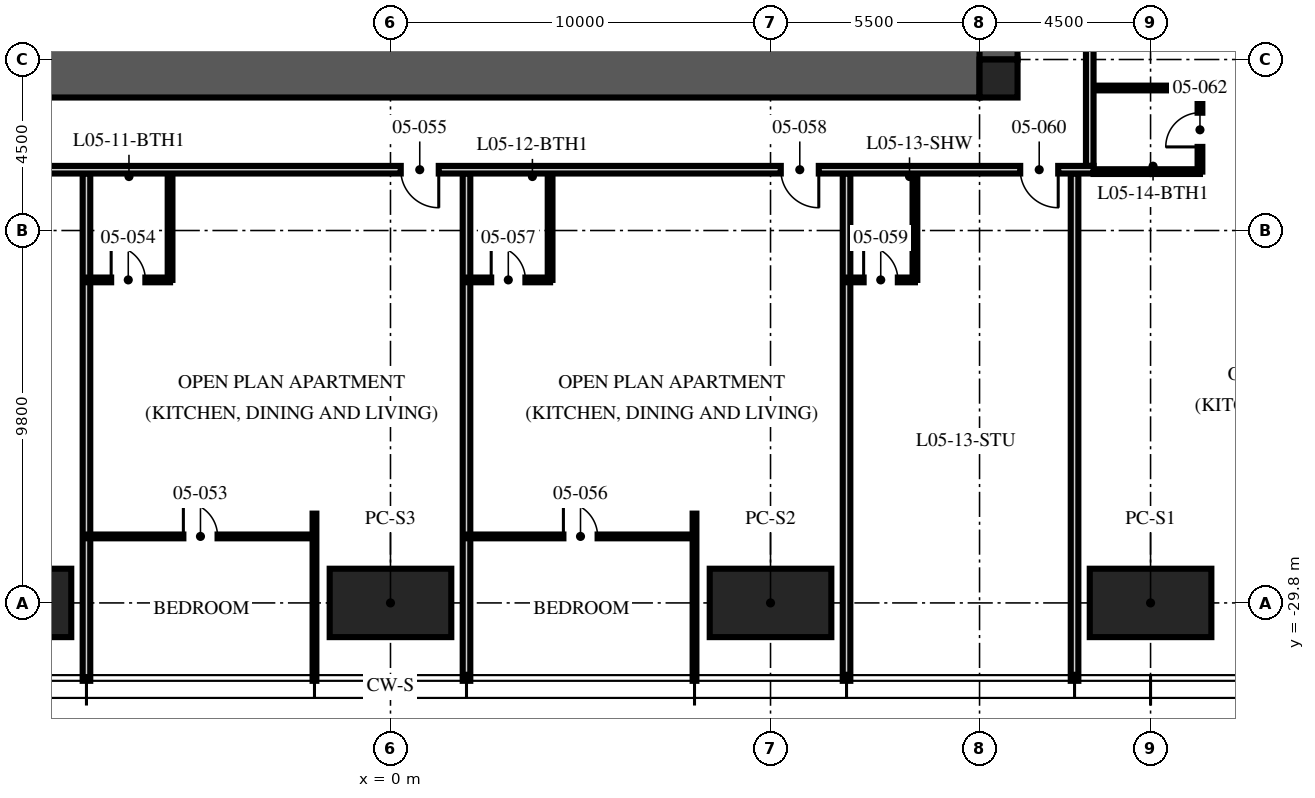
"""IFC4 building model, lengths in metres.
Left out: names, types, materials, properties, quantities, classifications, styles, units other than length and angle.
Written with IfcOpenShell. Run it as: python <this file> out.ifc"""

import sys

from ifc_helpers import new_model, si_unit, direction, frame, frame_2d, origin, origin_2d, place, context, subcontext, project, spatial, rectangle, hollow_rectangle, extrude, element, fill, save


model = new_model("IFC4")
c1 = context("Model", 3, precision=1e-05, world=origin(), true_north=direction((0.0, 1.0)))
c2 = subcontext(c1, "Body", "Model", "MODEL_VIEW")
j1 = project(units=[si_unit("LENGTHUNIT", "METRE"), si_unit("PLANEANGLEUNIT", "RADIAN")], contexts=[c1])
p1 = place(None, origin())
s1 = spatial("IfcSite", under=j1, at=p1, CompositionType="ELEMENT")
p2 = place(p1, origin())
s2 = spatial("IfcBuilding", under=s1, at=p2, CompositionType="ELEMENT")
p3 = place(p2, frame((0.0, 0.0, 24.75)))
s3 = spatial("IfcBuildingStorey", under=s2, at=p3, CompositionType="ELEMENT", Elevation=24.75)
p4 = place(p3, frame((15.5, -15.5, -0.25), z_axis=(0.0, 0.0, 1.0), x_axis=(0.0, 1.0, 0.0)))
e1 = element("IfcWall", 1, at=p4, inside=s3, PredefinedType="SHEAR", context=c2, shape_type="SweptSolid", body=[
    extrude(rectangle(XDim=31.0, YDim=2.0, at=frame_2d((15.5, 0.0))), origin(), (0.0, 0.0, 1.0), 3.75),
])
p5 = place(p4, frame((6.5, 0.0, 0.25)))
e2 = element("IfcOpeningElement", 2, at=p5, cuts=e1, PredefinedType="OPENING", context=c2, shape_type="SweptSolid", body=[
    extrude(rectangle(XDim=1.2, YDim=2.1, at=frame_2d((0.6, 1.05))), frame((0.0, 1.01, 0.0), z_axis=(0.0, -1.0, 0.0), x_axis=(1.0, 0.0, 0.0)), (0.0, 0.0, 1.0), 2.02),
])
p6 = place(p4, frame((23.0, 0.0, 0.25)))
e3 = element("IfcOpeningElement", 3, at=p6, cuts=e1, PredefinedType="OPENING", context=c2, shape_type="SweptSolid", body=[
    extrude(rectangle(XDim=1.8, YDim=2.1, at=frame_2d((0.9, 1.05))), frame((0.0, 1.01, 0.0), z_axis=(0.0, -1.0, 0.0), x_axis=(1.0, 0.0, 0.0)), (0.0, 0.0, 1.0), 2.02),
])
p7 = place(p3, frame((-15.5, -15.5, -0.25), z_axis=(0.0, 0.0, 1.0), x_axis=(1.0, 0.0, 0.0)))
e4 = element("IfcWall", 4, at=p7, inside=s3, PredefinedType="SHEAR", context=c2, shape_type="SweptSolid", body=[
    extrude(rectangle(XDim=31.0, YDim=2.0, at=frame_2d((15.5, 0.0))), origin(), (0.0, 0.0, 1.0), 3.75),
])
p8 = place(p3, frame((16.0, -16.0, -0.25), z_axis=(0.0, 0.0, 1.0), x_axis=(1.0, 0.0, 0.0)))
e5 = element("IfcColumn", 5, at=p8, inside=s3, PredefinedType="COLUMN", context=c2, shape_type="SweptSolid", body=[
    extrude(rectangle(XDim=1.0, YDim=1.0, at=origin_2d()), origin(), (0.0, 0.0, 1.0), 3.75),
])
for number, where, z_axis, x_axis in (
    (6, (20.0, -29.8, 0.0), (0.0, 0.0, 1.0), (1.0, 0.0, 0.0)),
    (7, (10.0, -29.8, 0.0), (0.0, 0.0, 1.0), (1.0, 0.0, 0.0)),
    (8, (0.0, -29.8, 0.0), (0.0, 0.0, 1.0), (1.0, 0.0, 0.0)),
    (9, (-10.0, -29.8, 0.0), (0.0, 0.0, 1.0), (1.0, 0.0, 0.0)),
):
    element("IfcColumn", number, at=place(p3, frame(where, z_axis=z_axis, x_axis=x_axis)), inside=s3, PredefinedType="COLUMN", context=c2, shape_type="SweptSolid", body=[
        extrude(hollow_rectangle(XDim=3.2, YDim=1.8, WallThickness=0.2, at=origin_2d()), origin(), (0.0, 0.0, 1.0), 3.75),
    ])
p9 = place(p3, frame((-8.0, -18.5, 0.0), z_axis=(0.0, 0.0, 1.0), x_axis=(0.0, -1.0, 0.0)))
e10 = element("IfcWall", 10, at=p9, inside=s3, PredefinedType="PARTITIONING", context=c2, shape_type="SweptSolid", body=[
    extrude(rectangle(XDim=13.35, YDim=0.2, at=frame_2d((6.675, 0.0))), origin(), (0.0, 0.0, 1.0), 2.71),
])
p10 = place(p3, frame((-2.0, -27.45, 0.0), z_axis=(0.0, 0.0, 1.0), x_axis=(0.0, -1.0, 0.0)))
e11 = element("IfcWall", 11, at=p10, inside=s3, PredefinedType="PARTITIONING", context=c2, shape_type="SweptSolid", body=[
    extrude(rectangle(XDim=4.4, YDim=0.1, at=frame_2d((2.2, 0.0))), origin(), (0.0, 0.0, 1.0), 2.71),
])
p11 = place(p3, frame((2.0, -18.5, 0.0), z_axis=(0.0, 0.0, 1.0), x_axis=(0.0, -1.0, 0.0)))
e12 = element("IfcWall", 12, at=p11, inside=s3, PredefinedType="PARTITIONING", context=c2, shape_type="SweptSolid", body=[
    extrude(rectangle(XDim=13.35, YDim=0.2, at=frame_2d((6.675, 0.0))), origin(), (0.0, 0.0, 1.0), 2.71),
])
p12 = place(p3, frame((8.0, -27.45, 0.0), z_axis=(0.0, 0.0, 1.0), x_axis=(0.0, -1.0, 0.0)))
e13 = element("IfcWall", 13, at=p12, inside=s3, PredefinedType="PARTITIONING", context=c2, shape_type="SweptSolid", body=[
    extrude(rectangle(XDim=4.4, YDim=0.1, at=frame_2d((2.2, 0.0))), origin(), (0.0, 0.0, 1.0), 2.71),
])
p13 = place(p3, frame((12.0, -18.5, 0.0), z_axis=(0.0, 0.0, 1.0), x_axis=(0.0, -1.0, 0.0)))
e14 = element("IfcWall", 14, at=p13, inside=s3, PredefinedType="PARTITIONING", context=c2, shape_type="SweptSolid", body=[
    extrude(rectangle(XDim=13.35, YDim=0.2, at=frame_2d((6.675, 0.0))), origin(), (0.0, 0.0, 1.0), 2.71),
])
p14 = place(p3, frame((18.0, -18.5, 0.0), z_axis=(0.0, 0.0, 1.0), x_axis=(0.0, -1.0, 0.0)))
e15 = element("IfcWall", 15, at=p14, inside=s3, PredefinedType="PARTITIONING", context=c2, shape_type="SweptSolid", body=[
    extrude(rectangle(XDim=13.35, YDim=0.2, at=frame_2d((6.675, 0.0))), origin(), (0.0, 0.0, 1.0), 2.3),
])
p15 = place(p3, frame((-8.0, -28.05, 0.0), z_axis=(0.0, 0.0, 1.0), x_axis=(1.0, 0.0, 0.0)))
e16 = element("IfcWall", 16, at=p15, inside=s3, PredefinedType="PARTITIONING", context=c2, shape_type="SweptSolid", body=[
    extrude(rectangle(XDim=6.0, YDim=0.1, at=frame_2d((3.0, 0.0))), origin(), (0.0, 0.0, 1.0), 2.61),
])
p16 = place(p15, frame((2.55, 0.0, 0.0)))
e17 = element("IfcOpeningElement", 17, at=p16, cuts=e16, PredefinedType="OPENING", context=c2, shape_type="SweptSolid", body=[
    extrude(rectangle(XDim=0.9, YDim=2.1, at=frame_2d((0.45, 1.05))), frame((0.0, 0.06, 0.0), z_axis=(0.0, -1.0, 0.0), x_axis=(1.0, 0.0, 0.0)), (0.0, 0.0, 1.0), 0.12),
])
p17 = place(p3, frame((-8.0, -21.3, 0.0), z_axis=(0.0, 0.0, 1.0), x_axis=(1.0, 0.0, 0.0)))
e18 = element("IfcWall", 18, at=p17, inside=s3, PredefinedType="PARTITIONING", context=c2, shape_type="SweptSolid", body=[
    extrude(rectangle(XDim=2.2, YDim=0.125, at=frame_2d((1.1, 0.0))), origin(), (0.0, 0.0, 1.0), 3.5),
])
p18 = place(p17, frame((0.65, 0.0, 0.0)))
e19 = element("IfcOpeningElement", 19, at=p18, cuts=e18, PredefinedType="OPENING", context=c2, shape_type="SweptSolid", body=[
    extrude(rectangle(XDim=0.9, YDim=2.1, at=frame_2d((0.45, 1.05))), frame((0.0, 0.073, 0.0), z_axis=(0.0, -1.0, 0.0), x_axis=(1.0, 0.0, 0.0)), (0.0, 0.0, 1.0), 0.145),
])
p19 = place(p3, frame((-5.8, -18.5, 0.0), z_axis=(0.0, 0.0, 1.0), x_axis=(0.0, -1.0, 0.0)))
e20 = element("IfcWall", 20, at=p19, inside=s3, PredefinedType="PARTITIONING", context=c2, shape_type="SweptSolid", body=[
    extrude(rectangle(XDim=2.8, YDim=0.125, at=frame_2d((1.4, 0.0))), origin(), (0.0, 0.0, 1.0), 3.5),
])
p20 = place(p3, frame((2.0, -28.05, 0.0), z_axis=(0.0, 0.0, 1.0), x_axis=(1.0, 0.0, 0.0)))
e21 = element("IfcWall", 21, at=p20, inside=s3, PredefinedType="PARTITIONING", context=c2, shape_type="SweptSolid", body=[
    extrude(rectangle(XDim=6.0, YDim=0.1, at=frame_2d((3.0, 0.0))), origin(), (0.0, 0.0, 1.0), 2.61),
])
p21 = place(p20, frame((2.55, 0.0, 0.0)))
e22 = element("IfcOpeningElement", 22, at=p21, cuts=e21, PredefinedType="OPENING", context=c2, shape_type="SweptSolid", body=[
    extrude(rectangle(XDim=0.9, YDim=2.1, at=frame_2d((0.45, 1.05))), frame((0.0, 0.06, 0.0), z_axis=(0.0, -1.0, 0.0), x_axis=(1.0, 0.0, 0.0)), (0.0, 0.0, 1.0), 0.12),
])
p22 = place(p3, frame((2.0, -21.3, 0.0), z_axis=(0.0, 0.0, 1.0), x_axis=(1.0, 0.0, 0.0)))
e23 = element("IfcWall", 23, at=p22, inside=s3, PredefinedType="PARTITIONING", context=c2, shape_type="SweptSolid", body=[
    extrude(rectangle(XDim=2.2, YDim=0.125, at=frame_2d((1.1, 0.0))), origin(), (0.0, 0.0, 1.0), 3.5),
])
p23 = place(p22, frame((0.65, 0.0, 0.0)))
e24 = element("IfcOpeningElement", 24, at=p23, cuts=e23, PredefinedType="OPENING", context=c2, shape_type="SweptSolid", body=[
    extrude(rectangle(XDim=0.9, YDim=2.1, at=frame_2d((0.45, 1.05))), frame((0.0, 0.073, 0.0), z_axis=(0.0, -1.0, 0.0), x_axis=(1.0, 0.0, 0.0)), (0.0, 0.0, 1.0), 0.145),
])
p24 = place(p3, frame((4.2, -18.5, 0.0), z_axis=(0.0, 0.0, 1.0), x_axis=(0.0, -1.0, 0.0)))
e25 = element("IfcWall", 25, at=p24, inside=s3, PredefinedType="PARTITIONING", context=c2, shape_type="SweptSolid", body=[
    extrude(rectangle(XDim=2.8, YDim=0.125, at=frame_2d((1.4, 0.0))), origin(), (0.0, 0.0, 1.0), 3.5),
])
p25 = place(p3, frame((12.0, -21.3, 0.0), z_axis=(0.0, 0.0, 1.0), x_axis=(1.0, 0.0, 0.0)))
e26 = element("IfcWall", 26, at=p25, inside=s3, PredefinedType="PARTITIONING", context=c2, shape_type="SweptSolid", body=[
    extrude(rectangle(XDim=1.8, YDim=0.125, at=frame_2d((0.9, 0.0))), origin(), (0.0, 0.0, 1.0), 3.5),
])
p26 = place(p25, frame((0.45, 0.0, 0.0)))
e27 = element("IfcOpeningElement", 27, at=p26, cuts=e26, PredefinedType="OPENING", context=c2, shape_type="SweptSolid", body=[
    extrude(rectangle(XDim=0.9, YDim=2.1, at=frame_2d((0.45, 1.05))), frame((0.0, 0.073, 0.0), z_axis=(0.0, -1.0, 0.0), x_axis=(1.0, 0.0, 0.0)), (0.0, 0.0, 1.0), 0.145),
])
p27 = place(p3, frame((13.8, -18.5, 0.0), z_axis=(0.0, 0.0, 1.0), x_axis=(0.0, -1.0, 0.0)))
e28 = element("IfcWall", 28, at=p27, inside=s3, PredefinedType="PARTITIONING", context=c2, shape_type="SweptSolid", body=[
    extrude(rectangle(XDim=2.8, YDim=0.125, at=frame_2d((1.4, 0.0))), origin(), (0.0, 0.0, 1.0), 3.5),
])
p28 = place(p3, frame((21.3, -18.45, 0.0), z_axis=(0.0, 0.0, 1.0), x_axis=(0.0, 1.0, 0.0)))
e29 = element("IfcWall", 29, at=p28, inside=s3, PredefinedType="PARTITIONING", context=c2, shape_type="SweptSolid", body=[
    extrude(rectangle(XDim=2.2, YDim=0.125, at=frame_2d((1.1, 0.0))), origin(), (0.0, 0.0, 1.0), 3.5),
])
p29 = place(p28, frame((0.65, 0.0, 0.0)))
e30 = element("IfcOpeningElement", 30, at=p29, cuts=e29, PredefinedType="OPENING", context=c2, shape_type="SweptSolid", body=[
    extrude(rectangle(XDim=0.9, YDim=2.1, at=frame_2d((0.45, 1.05))), frame((0.0, 0.073, 0.0), z_axis=(0.0, -1.0, 0.0), x_axis=(1.0, 0.0, 0.0)), (0.0, 0.0, 1.0), 0.145),
])
p30 = place(p3, frame((18.5, -18.45, 0.0), z_axis=(0.0, 0.0, 1.0), x_axis=(1.0, 0.0, 0.0)))
e31 = element("IfcWall", 31, at=p30, inside=s3, PredefinedType="PARTITIONING", context=c2, shape_type="SweptSolid", body=[
    extrude(rectangle(XDim=2.8, YDim=0.125, at=frame_2d((1.4, 0.0))), origin(), (0.0, 0.0, 1.0), 2.3),
])
p31 = place(p3, frame((18.5, -16.25, 0.0), z_axis=(0.0, 0.0, 1.0), x_axis=(1.0, 0.0, 0.0)))
e32 = element("IfcWall", 32, at=p31, inside=s3, PredefinedType="PARTITIONING", context=c2, shape_type="SweptSolid", body=[
    extrude(rectangle(XDim=2.8, YDim=0.125, at=frame_2d((1.4, 0.0))), origin(), (0.0, 0.0, 1.0), 3.5),
])
p32 = place(p3, frame((18.4, -18.3, 0.0), z_axis=(0.0, 0.0, 1.0), x_axis=(0.0, 1.0, 0.0)))
e33 = element("IfcWall", 33, at=p32, inside=s3, PredefinedType="PARTITIONING", context=c2, shape_type="SweptSolid", body=[
    extrude(rectangle(XDim=14.3, YDim=0.2, at=frame_2d((7.15, 0.0))), origin(), (0.0, 0.0, 1.0), 2.3),
])
p33 = place(p32, frame((8.7, 0.0, 0.0)))
e34 = element("IfcOpeningElement", 34, at=p33, cuts=e33, PredefinedType="OPENING", context=c2, shape_type="SweptSolid", body=[
    extrude(rectangle(XDim=1.0, YDim=2.2, at=frame_2d((0.5, 1.1))), frame((0.0, 0.11, 0.0), z_axis=(0.0, -1.0, 0.0), x_axis=(1.0, 0.0, 0.0)), (0.0, 0.0, 1.0), 0.22),
])
p34 = place(p3, frame((18.5, -18.4, 0.0), z_axis=(0.0, 0.0, 1.0), x_axis=(-1.0, 0.0, 0.0)))
e35 = element("IfcWall", 35, at=p34, inside=s3, PredefinedType="PARTITIONING", context=c2, shape_type="SweptSolid", body=[
    extrude(rectangle(XDim=37.0, YDim=0.2, at=frame_2d((18.5, 0.0))), origin(), (0.0, 0.0, 1.0), 2.3),
])
p35 = place(p34, frame((17.23, 0.0, 0.0)))
e36 = element("IfcOpeningElement", 36, at=p35, cuts=e35, PredefinedType="OPENING", context=c2, shape_type="SweptSolid", body=[
    extrude(rectangle(XDim=1.0, YDim=2.2, at=frame_2d((0.5, 1.1))), frame((0.0, 0.11, 0.0), z_axis=(0.0, -1.0, 0.0), x_axis=(1.0, 0.0, 0.0)), (0.0, 0.0, 1.0), 0.22),
])
p36 = place(p34, frame((7.23, 0.0, 0.0)))
e37 = element("IfcOpeningElement", 37, at=p36, cuts=e35, PredefinedType="OPENING", context=c2, shape_type="SweptSolid", body=[
    extrude(rectangle(XDim=1.0, YDim=2.2, at=frame_2d((0.5, 1.1))), frame((0.0, 0.11, 0.0), z_axis=(0.0, -1.0, 0.0), x_axis=(1.0, 0.0, 0.0)), (0.0, 0.0, 1.0), 0.22),
])
p37 = place(p34, frame((0.93, 0.0, 0.0)))
e38 = element("IfcOpeningElement", 38, at=p37, cuts=e35, PredefinedType="OPENING", context=c2, shape_type="SweptSolid", body=[
    extrude(rectangle(XDim=1.0, YDim=2.2, at=frame_2d((0.5, 1.1))), frame((0.0, 0.11, 0.0), z_axis=(0.0, -1.0, 0.0), x_axis=(1.0, 0.0, 0.0)), (0.0, 0.0, 1.0), 0.22),
])
p38 = place(p16, origin())
e39 = element("IfcDoor", 39, at=p38, inside=s3, OperationType="SINGLE_SWING_LEFT", PredefinedType="DOOR", context=c2, shape_type="SweptSolid", body=[
    extrude(rectangle(XDim=0.9, YDim=2.1, at=frame_2d((0.45, 1.05))), frame((0.0, 0.025, 0.0), z_axis=(0.0, -1.0, 0.0), x_axis=(1.0, 0.0, 0.0)), (0.0, 0.0, 1.0), 0.05),
])
fill(e17, e39)
p39 = place(p18, origin())
e40 = element("IfcDoor", 40, at=p39, inside=s3, OperationType="SINGLE_SWING_LEFT", PredefinedType="DOOR", context=c2, shape_type="SweptSolid", body=[
    extrude(rectangle(XDim=0.9, YDim=2.1, at=frame_2d((0.45, 1.05))), frame((0.0, 0.025, 0.0), z_axis=(0.0, -1.0, 0.0), x_axis=(1.0, 0.0, 0.0)), (0.0, 0.0, 1.0), 0.05),
])
fill(e19, e40)
p40 = place(p35, origin())
e41 = element("IfcDoor", 41, at=p40, inside=s3, OperationType="SINGLE_SWING_LEFT", PredefinedType="DOOR", context=c2, shape_type="SweptSolid", body=[
    extrude(rectangle(XDim=1.0, YDim=2.2, at=frame_2d((0.5, 1.1))), frame((0.0, 0.025, 0.0), z_axis=(0.0, -1.0, 0.0), x_axis=(1.0, 0.0, 0.0)), (0.0, 0.0, 1.0), 0.05),
])
fill(e36, e41)
p41 = place(p21, origin())
e42 = element("IfcDoor", 42, at=p41, inside=s3, OperationType="SINGLE_SWING_LEFT", PredefinedType="DOOR", context=c2, shape_type="SweptSolid", body=[
    extrude(rectangle(XDim=0.9, YDim=2.1, at=frame_2d((0.45, 1.05))), frame((0.0, 0.025, 0.0), z_axis=(0.0, -1.0, 0.0), x_axis=(1.0, 0.0, 0.0)), (0.0, 0.0, 1.0), 0.05),
])
fill(e22, e42)
p42 = place(p23, origin())
e43 = element("IfcDoor", 43, at=p42, inside=s3, OperationType="SINGLE_SWING_LEFT", PredefinedType="DOOR", context=c2, shape_type="SweptSolid", body=[
    extrude(rectangle(XDim=0.9, YDim=2.1, at=frame_2d((0.45, 1.05))), frame((0.0, 0.025, 0.0), z_axis=(0.0, -1.0, 0.0), x_axis=(1.0, 0.0, 0.0)), (0.0, 0.0, 1.0), 0.05),
])
fill(e24, e43)
p43 = place(p36, origin())
e44 = element("IfcDoor", 44, at=p43, inside=s3, OperationType="SINGLE_SWING_LEFT", PredefinedType="DOOR", context=c2, shape_type="SweptSolid", body=[
    extrude(rectangle(XDim=1.0, YDim=2.2, at=frame_2d((0.5, 1.1))), frame((0.0, 0.025, 0.0), z_axis=(0.0, -1.0, 0.0), x_axis=(1.0, 0.0, 0.0)), (0.0, 0.0, 1.0), 0.05),
])
fill(e37, e44)
p44 = place(p26, origin())
e45 = element("IfcDoor", 45, at=p44, inside=s3, OperationType="SINGLE_SWING_LEFT", PredefinedType="DOOR", context=c2, shape_type="SweptSolid", body=[
    extrude(rectangle(XDim=0.9, YDim=2.1, at=frame_2d((0.45, 1.05))), frame((0.0, 0.025, 0.0), z_axis=(0.0, -1.0, 0.0), x_axis=(1.0, 0.0, 0.0)), (0.0, 0.0, 1.0), 0.05),
])
fill(e27, e45)
p45 = place(p37, origin())
e46 = element("IfcDoor", 46, at=p45, inside=s3, OperationType="SINGLE_SWING_LEFT", PredefinedType="DOOR", context=c2, shape_type="SweptSolid", body=[
    extrude(rectangle(XDim=1.0, YDim=2.2, at=frame_2d((0.5, 1.1))), frame((0.0, 0.025, 0.0), z_axis=(0.0, -1.0, 0.0), x_axis=(1.0, 0.0, 0.0)), (0.0, 0.0, 1.0), 0.05),
])
fill(e38, e46)
p46 = place(p29, origin())
e47 = element("IfcDoor", 47, at=p46, inside=s3, OperationType="SINGLE_SWING_LEFT", PredefinedType="DOOR", context=c2, shape_type="SweptSolid", body=[
    extrude(rectangle(XDim=0.9, YDim=2.1, at=frame_2d((0.45, 1.05))), frame((0.0, 0.025, 0.0), z_axis=(0.0, -1.0, 0.0), x_axis=(1.0, 0.0, 0.0)), (0.0, 0.0, 1.0), 0.05),
])
fill(e30, e47)
save(model, sys.argv[1])
